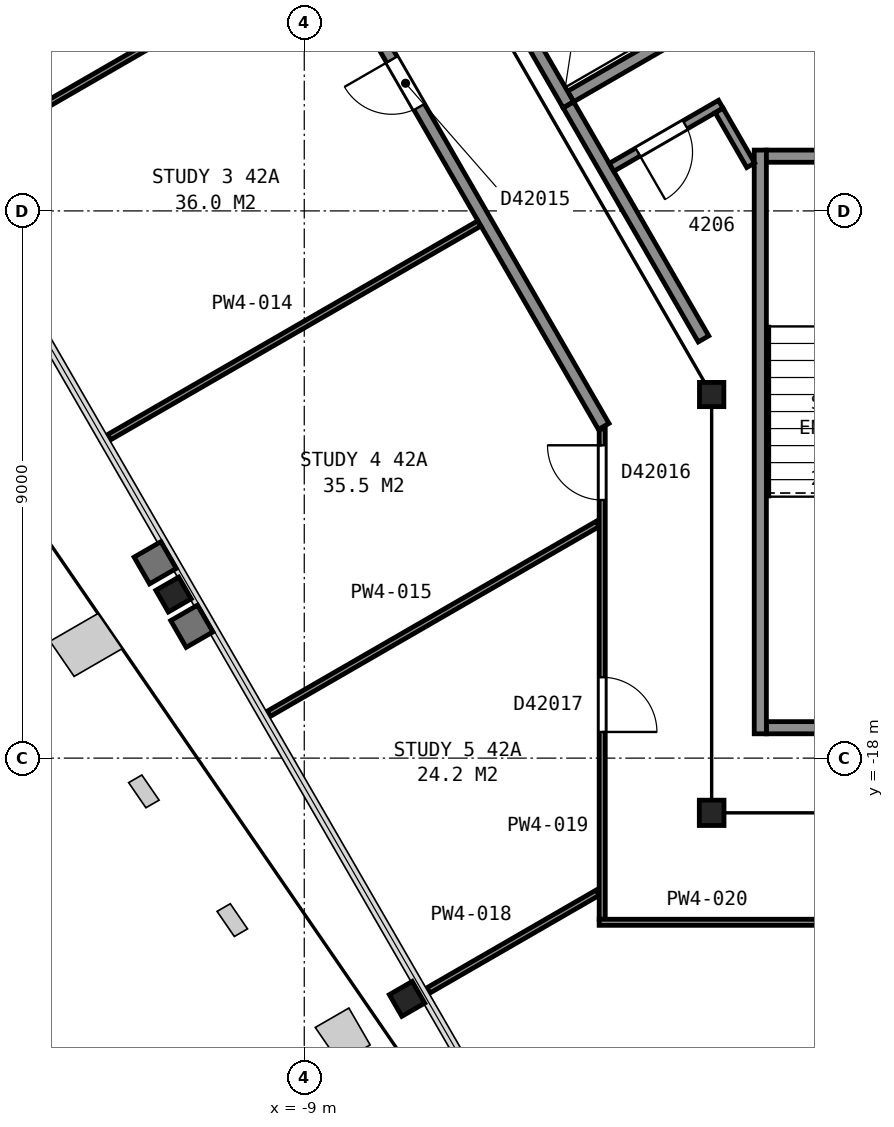
"""IFC4 building model, lengths in metres.
Left out: names, types, materials, properties, quantities, classifications, styles, units other than length and angle.
Written with IfcOpenShell. Run it as: python <this file> out.ifc"""

import sys

from ifc_helpers import new_model, si_unit, direction, frame, frame_2d, origin, origin_2d, place, context, subcontext, project, spatial, rectangle, i_section, extrude, element, fill, save


model = new_model("IFC4")
c1 = context("Model", 3, precision=1e-05, world=origin(), true_north=direction((0.0, 1.0)))
c2 = subcontext(c1, "Body", "Model", "MODEL_VIEW")
j1 = project(units=[si_unit("LENGTHUNIT", "METRE"), si_unit("PLANEANGLEUNIT", "RADIAN")], contexts=[c1])
p1 = place(None, origin())
s1 = spatial("IfcSite", under=j1, at=p1, CompositionType="ELEMENT")
p2 = place(p1, origin())
s2 = spatial("IfcBuilding", under=s1, at=p2, CompositionType="ELEMENT")
p3 = place(p2, frame((0.0, 0.0, 171.0)))
s3 = spatial("IfcBuildingStorey", under=s2, at=p3, CompositionType="ELEMENT", Elevation=171.0)
p4 = place(p3, frame((-11.15, -15.31, 0.0), z_axis=(0.0, 0.0, 1.0), x_axis=(-0.5, 0.866025403784, 0.0)))
e1 = element("IfcColumn", 1, at=p4, inside=s3, PredefinedType="COLUMN", context=c2, shape_type="SweptSolid", body=[
    extrude(i_section(OverallWidth=0.411, OverallDepth=0.434, WebThickness=0.036, FlangeThickness=0.057, FilletRadius=0.015, at=origin_2d()), origin(), (0.0, 0.0, 1.0), 3.665),
])
p5 = place(p3, frame((-7.31, -21.96, 0.0), z_axis=(0.0, 0.0, 1.0), x_axis=(-0.5, 0.866025403784, 0.0)))
e2 = element("IfcColumn", 2, at=p5, inside=s3, PredefinedType="COLUMN", context=c2, shape_type="SweptSolid", body=[
    extrude(i_section(OverallWidth=0.411, OverallDepth=0.434, WebThickness=0.036, FlangeThickness=0.057, FilletRadius=0.015, at=origin_2d()), origin(), (0.0, 0.0, 1.0), 3.66),
])
p6 = place(p3, frame((-2.3, -12.02, 0.0), z_axis=(0.0, 0.0, 1.0), x_axis=(1.0, 0.0, 0.0)))
e3 = element("IfcColumn", 3, at=p6, inside=s3, PredefinedType="COLUMN", context=c2, shape_type="SweptSolid", body=[
    extrude(i_section(OverallWidth=0.401, OverallDepth=0.399, WebThickness=0.025, FlangeThickness=0.04, FilletRadius=0.015, at=origin_2d()), origin(), (0.0, 0.0, 1.0), 3.7),
])
p7 = place(p3, frame((-2.3, -18.9, 0.0), z_axis=(0.0, 0.0, 1.0), x_axis=(-1.0, 0.0, 0.0)))
e4 = element("IfcColumn", 4, at=p7, inside=s3, PredefinedType="COLUMN", context=c2, shape_type="SweptSolid", body=[
    extrude(i_section(OverallWidth=0.406, OverallDepth=0.417, WebThickness=0.03, FlangeThickness=0.048, FilletRadius=0.015, at=origin_2d()), origin(), (0.0, 0.0, 1.0), 3.7),
])
p8 = place(p3, frame((-1.4, -17.5, 0.0), z_axis=(0.0, 0.0, 1.0), x_axis=(1.0, 0.0, 0.0)))
e5 = element("IfcWall", 5, at=p8, inside=s3, PredefinedType="PARTITIONING", context=c2, shape_type="SweptSolid", body=[
    extrude(rectangle(XDim=2.8, YDim=0.2, at=frame_2d((1.4, 0.0))), origin(), (0.0, 0.0, 1.0), 3.45),
])
p9 = place(p8, frame((0.85, 0.0, 0.0)))
e6 = element("IfcOpeningElement", 6, at=p9, cuts=e5, PredefinedType="OPENING", context=c2, shape_type="SweptSolid", body=[
    extrude(rectangle(XDim=1.1, YDim=2.1, at=frame_2d((0.55, 1.05))), frame((0.0, 0.11, 0.0), z_axis=(0.0, -1.0, 0.0), x_axis=(1.0, 0.0, 0.0)), (0.0, 0.0, 1.0), 0.22),
])
p10 = place(p3, frame((-1.5, -8.0, 0.0), z_axis=(0.0, 0.0, 1.0), x_axis=(0.0, -1.0, 0.0)))
e7 = element("IfcWall", 7, at=p10, inside=s3, PredefinedType="PARTITIONING", context=c2, shape_type="SweptSolid", body=[
    extrude(rectangle(XDim=9.6, YDim=0.2, at=frame_2d((4.8, 0.0))), origin(), (0.0, 0.0, 1.0), 3.45),
])
p11 = place(p3, frame((-1.4, -8.1, 0.0), z_axis=(0.0, 0.0, 1.0), x_axis=(1.0, 0.0, 0.0)))
e8 = element("IfcWall", 8, at=p11, inside=s3, PredefinedType="PARTITIONING", context=c2, shape_type="SweptSolid", body=[
    extrude(rectangle(XDim=2.8, YDim=0.2, at=frame_2d((1.4, 0.0))), origin(), (0.0, 0.0, 1.0), 3.45),
])
p12 = place(p3, frame((-4.62, -7.118, 0.0), z_axis=(0.0, 0.0, 1.0), x_axis=(0.866036909293, 0.499980071345, 0.0)))
e9 = element("IfcWall", 9, at=p12, inside=s3, PredefinedType="PARTITIONING", context=c2, shape_type="SweptSolid", body=[
    extrude(rectangle(XDim=1.75, YDim=0.2, at=frame_2d((0.875, 0.0))), origin(), (0.0, 0.0, 1.0), 3.7),
])
p13 = place(p3, frame((-4.656, -7.255, 0.0), z_axis=(0.0, 0.0, 1.0), x_axis=(-0.499990435942, 0.866030925526, 0.0)))
e10 = element("IfcWall", 10, at=p13, inside=s3, PredefinedType="PARTITIONING", context=c2, shape_type="SweptSolid", body=[
    extrude(rectangle(XDim=2.55, YDim=0.2, at=frame_2d((1.275, 0.0))), origin(), (0.0, 0.0, 1.0), 3.7),
])
p14 = place(p3, frame((-4.655, -7.257, 0.0), z_axis=(0.0, 0.0, 1.0), x_axis=(0.499892115999, -0.866087681682, 0.0)))
e11 = element("IfcWall", 11, at=p14, inside=s3, PredefinedType="PARTITIONING", context=c2, shape_type="SweptSolid", body=[
    extrude(rectangle(XDim=4.443, YDim=0.2, at=frame_2d((2.221, 0.0))), origin(), (0.0, 0.0, 1.0), 3.45),
])
p15 = place(p3, frame((-2.15, -7.246, 0.0), z_axis=(0.0, 0.0, 1.0), x_axis=(-0.866099396229, -0.499871819421, 0.0)))
e12 = element("IfcWall", 12, at=p15, inside=s3, PredefinedType="PARTITIONING", context=c2, shape_type="SweptSolid", body=[
    extrude(rectangle(XDim=2.075, YDim=0.15, at=frame_2d((1.038, 0.0))), origin(), (0.0, 0.0, 1.0), 3.45),
])
p16 = place(p15, frame((0.675, 0.0, 0.0)))
e13 = element("IfcOpeningElement", 13, at=p16, cuts=e12, PredefinedType="OPENING", context=c2, shape_type="SweptSolid", body=[
    extrude(rectangle(XDim=0.9, YDim=2.1, at=frame_2d((0.45, 1.05))), frame((0.0, 0.085, 0.0), z_axis=(0.0, -1.0, 0.0), x_axis=(1.0, 0.0, 0.0)), (0.0, 0.0, 1.0), 0.17),
])
p17 = place(p3, frame((-2.177, -7.348, 0.0), z_axis=(0.0, 0.0, 1.0), x_axis=(0.49972245349, -0.866185586049, 0.0)))
e14 = element("IfcWall", 14, at=p17, inside=s3, PredefinedType="PARTITIONING", context=c2, shape_type="SweptSolid", body=[
    extrude(rectangle(XDim=1.041, YDim=0.15, at=frame_2d((0.52, 0.0))), origin(), (0.0, 0.0, 1.0), 3.45),
])
p18 = place(p3, frame((-14.836, -8.173, 0.0), z_axis=(0.0, 0.0, 1.0), x_axis=(0.866006381746, 0.500032945689, 0.0)))
e15 = element("IfcWall", 15, at=p18, inside=s3, PredefinedType="PARTITIONING", context=c2, shape_type="SweptSolid", body=[
    extrude(rectangle(XDim=7.033, YDim=0.1, at=frame_2d((3.517, 0.0))), origin(), (0.0, 0.0, 1.0), 2.713),
])
p19 = place(p3, frame((-4.075, -12.545, 0.0), z_axis=(0.0, 0.0, 1.0), x_axis=(-0.499999743747, 0.866025551732, 0.0)))
e16 = element("IfcWall", 16, at=p19, inside=s3, PredefinedType="PARTITIONING", context=c2, shape_type="SweptSolid", body=[
    extrude(rectangle(XDim=17.656, YDim=0.2, at=frame_2d((8.828, 0.0))), origin(), (0.0, 0.0, 1.0), 2.713),
])
p20 = place(p19, frame((10.08, 0.0, 0.0)))
e17 = element("IfcOpeningElement", 17, at=p20, cuts=e16, PredefinedType="OPENING", context=c2, shape_type="SweptSolid", body=[
    extrude(rectangle(XDim=0.9, YDim=2.1, at=frame_2d((0.45, 1.05))), frame((0.0, 0.11, 0.0), z_axis=(0.0, -1.0, 0.0), x_axis=(1.0, 0.0, 0.0)), (0.0, 0.0, 1.0), 0.22),
])
p21 = place(p19, frame((6.068, 0.0, 0.0)))
e18 = element("IfcOpeningElement", 18, at=p21, cuts=e16, PredefinedType="OPENING", context=c2, shape_type="SweptSolid", body=[
    extrude(rectangle(XDim=0.9, YDim=2.1, at=frame_2d((0.45, 1.05))), frame((0.0, 0.11, 0.0), z_axis=(0.0, -1.0, 0.0), x_axis=(1.0, 0.0, 0.0)), (0.0, 0.0, 1.0), 0.22),
])
p22 = place(p3, frame((-12.21, -12.722, 0.0), z_axis=(0.0, 0.0, 1.0), x_axis=(0.866002795668, 0.500039156363, 0.0)))
e19 = element("IfcWall", 19, at=p22, inside=s3, PredefinedType="PARTITIONING", context=c2, shape_type="SweptSolid", body=[
    extrude(rectangle(XDim=7.029, YDim=0.1, at=frame_2d((3.514, 0.0))), origin(), (0.0, 0.0, 1.0), 2.713),
])
p23 = place(p3, frame((-9.584, -17.271, 0.0), z_axis=(0.0, 0.0, 1.0), x_axis=(0.866018935351, 0.500011203488, 0.0)))
e20 = element("IfcWall", 20, at=p23, inside=s3, PredefinedType="PARTITIONING", context=c2, shape_type="SweptSolid", body=[
    extrude(rectangle(XDim=6.245, YDim=0.1, at=frame_2d((3.123, 0.0))), origin(), (0.0, 0.0, 1.0), 2.713),
])
p24 = place(p3, frame((-6.958, -21.82, 0.0), z_axis=(0.0, 0.0, 1.0), x_axis=(0.86602741148, 0.499996522553, 0.0)))
e21 = element("IfcWall", 21, at=p24, inside=s3, PredefinedType="PARTITIONING", context=c2, shape_type="SweptSolid", body=[
    extrude(rectangle(XDim=3.213, YDim=0.1, at=frame_2d((1.606, 0.0))), origin(), (0.0, 0.0, 1.0), 2.713),
])
p25 = place(p3, frame((-4.1, -20.65, 0.0), z_axis=(0.0, 0.0, 1.0), x_axis=(0.0, 1.0, 0.0)))
e22 = element("IfcWall", 22, at=p25, inside=s3, PredefinedType="PARTITIONING", context=c2, shape_type="SweptSolid", body=[
    extrude(rectangle(XDim=8.063, YDim=0.1, at=frame_2d((4.031, 0.0))), origin(), (0.0, 0.0, 1.0), 2.713),
])
p26 = place(p25, frame((6.895, 0.0, 0.0)))
e23 = element("IfcOpeningElement", 23, at=p26, cuts=e22, PredefinedType="OPENING", context=c2, shape_type="SweptSolid", body=[
    extrude(rectangle(XDim=0.9, YDim=2.1, at=frame_2d((0.45, 1.05))), frame((0.0, 0.06, 0.0), z_axis=(0.0, -1.0, 0.0), x_axis=(1.0, 0.0, 0.0)), (0.0, 0.0, 1.0), 0.12),
])
p27 = place(p25, frame((3.08, 0.0, 0.0)))
e24 = element("IfcOpeningElement", 24, at=p27, cuts=e22, PredefinedType="OPENING", context=c2, shape_type="SweptSolid", body=[
    extrude(rectangle(XDim=0.9, YDim=2.1, at=frame_2d((0.45, 1.05))), frame((0.0, 0.06, 0.0), z_axis=(0.0, -1.0, 0.0), x_axis=(1.0, 0.0, 0.0)), (0.0, 0.0, 1.0), 0.12),
])
p28 = place(p3, frame((4.1, -20.7, 0.0), z_axis=(0.0, 0.0, 1.0), x_axis=(-1.0, 0.0, 0.0)))
e25 = element("IfcWall", 25, at=p28, inside=s3, PredefinedType="PARTITIONING", context=c2, shape_type="SweptSolid", body=[
    extrude(rectangle(XDim=8.25, YDim=0.1, at=frame_2d((4.125, 0.0))), origin(), (0.0, 0.0, 1.0), 2.713),
])
p29 = place(p28, frame((3.5, 0.0, 0.0)))
e26 = element("IfcOpeningElement", 26, at=p29, cuts=e25, PredefinedType="OPENING", context=c2, shape_type="SweptSolid", body=[
    extrude(rectangle(XDim=1.2, YDim=2.1, at=frame_2d((0.6, 1.05))), frame((0.0, 0.06, 0.0), z_axis=(0.0, -1.0, 0.0), x_axis=(1.0, 0.0, 0.0)), (0.0, 0.0, 1.0), 0.12),
])
p30 = place(p16, origin())
e27 = element("IfcDoor", 27, at=p30, inside=s3, OperationType="SINGLE_SWING_RIGHT", PredefinedType="DOOR", context=c2, shape_type="SweptSolid", body=[
    extrude(rectangle(XDim=0.9, YDim=2.1, at=frame_2d((0.45, 1.05))), frame((0.0, 0.025, 0.0), z_axis=(0.0, -1.0, 0.0), x_axis=(1.0, 0.0, 0.0)), (0.0, 0.0, 1.0), 0.05),
])
fill(e13, e27)
p31 = place(p21, origin())
e28 = element("IfcDoor", 28, at=p31, inside=s3, OperationType="SINGLE_SWING_RIGHT", PredefinedType="DOOR", context=c2, shape_type="SweptSolid", body=[
    extrude(rectangle(XDim=0.9, YDim=2.1, at=frame_2d((0.45, 1.05))), frame((0.0, 0.025, 0.0), z_axis=(0.0, -1.0, 0.0), x_axis=(1.0, 0.0, 0.0)), (0.0, 0.0, 1.0), 0.05),
])
fill(e18, e28)
p32 = place(p26, origin())
e29 = element("IfcDoor", 29, at=p32, inside=s3, OperationType="SINGLE_SWING_RIGHT", PredefinedType="DOOR", context=c2, shape_type="SweptSolid", body=[
    extrude(rectangle(XDim=0.9, YDim=2.1, at=frame_2d((0.45, 1.05))), frame((0.0, 0.025, 0.0), z_axis=(0.0, -1.0, 0.0), x_axis=(1.0, 0.0, 0.0)), (0.0, 0.0, 1.0), 0.05),
])
fill(e23, e29)
p33 = place(p27, origin())
e30 = element("IfcDoor", 30, at=p33, inside=s3, OperationType="SINGLE_SWING_LEFT", PredefinedType="DOOR", context=c2, shape_type="SweptSolid", body=[
    extrude(rectangle(XDim=0.9, YDim=2.1, at=frame_2d((0.45, 1.05))), frame((0.0, 0.025, 0.0), z_axis=(0.0, -1.0, 0.0), x_axis=(1.0, 0.0, 0.0)), (0.0, 0.0, 1.0), 0.05),
])
fill(e24, e30)
p34 = place(p29, origin())
e31 = element("IfcDoor", 31, at=p34, inside=s3, OperationType="SINGLE_SWING_LEFT", PredefinedType="DOOR", context=c2, shape_type="SweptSolid", body=[
    extrude(rectangle(XDim=1.2, YDim=2.1, at=frame_2d((0.6, 1.05))), frame((0.0, 0.025, 0.0), z_axis=(0.0, -1.0, 0.0), x_axis=(1.0, 0.0, 0.0)), (0.0, 0.0, 1.0), 0.05),
])
fill(e26, e31)
save(model, sys.argv[1])
